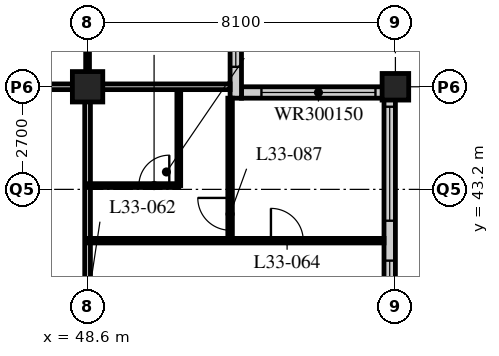
"""IFC4 building model, lengths in metres.
Left out: names, types, materials, properties, quantities, classifications, styles, units other than length and angle.
Written with IfcOpenShell. Run it as: python <this file> out.ifc"""

import sys

from ifc_helpers import new_model, si_unit, direction, frame, frame_2d, origin, origin_2d, place, context, subcontext, project, spatial, rectangle, hollow_rectangle, extrude, element, fill, save


model = new_model("IFC4")
c1 = context("Model", 3, precision=1e-05, world=origin(), true_north=direction((0.0, 1.0)))
c2 = subcontext(c1, "Body", "Model", "MODEL_VIEW")
j1 = project(units=[si_unit("LENGTHUNIT", "METRE"), si_unit("PLANEANGLEUNIT", "RADIAN")], contexts=[c1])
p1 = place(None, origin())
s1 = spatial("IfcSite", under=j1, at=p1, CompositionType="ELEMENT")
p2 = place(p1, origin())
s2 = spatial("IfcBuilding", under=s1, at=p2, CompositionType="ELEMENT")
p3 = place(p2, frame((0.0, 0.0, 130.6)))
s3 = spatial("IfcBuildingStorey", under=s2, at=p3, CompositionType="ELEMENT", Elevation=130.6)
p4 = place(p3, frame((48.6, 45.9, 0.0), z_axis=(0.0, 0.0, 1.0), x_axis=(1.0, 0.0, 0.0)))
e1 = element("IfcColumn", 1, at=p4, inside=s3, PredefinedType="COLUMN", context=c2, shape_type="SweptSolid", body=[
    extrude(hollow_rectangle(XDim=0.8, YDim=0.8, WallThickness=0.08, at=origin_2d()), origin(), (0.0, 0.0, 1.0), 3.4),
])
p5 = place(p3, frame((56.7, 45.9, 0.0), z_axis=(0.0, 0.0, 1.0), x_axis=(1.0, 0.0, 0.0)))
e2 = element("IfcColumn", 2, at=p5, inside=s3, PredefinedType="COLUMN", context=c2, shape_type="SweptSolid", body=[
    extrude(hollow_rectangle(XDim=0.7, YDim=0.7, WallThickness=0.07, at=origin_2d()), origin(), (0.0, 0.0, 1.0), 3.4),
])
p6 = place(p3, frame((56.55, 13.8, 0.0), z_axis=(0.0, 0.0, 1.0), x_axis=(0.0, 1.0, 0.0)))
e3 = element("IfcWall", 3, at=p6, inside=s3, PredefinedType="SOLIDWALL", context=c2, shape_type="SweptSolid", body=[
    extrude(rectangle(XDim=32.1, YDim=0.3, at=frame_2d((16.05, 0.0))), origin(), (0.0, 0.0, 1.0), 3.19),
])
p7 = place(p6, frame((0.225, 0.0, 0.9)))
e4 = element("IfcOpeningElement", 4, at=p7, cuts=e3, PredefinedType="OPENING", context=c2, shape_type="SweptSolid", body=[
    extrude(rectangle(XDim=3.0, YDim=2.0, at=frame_2d((1.5, 1.0))), frame((0.0, 0.16, 0.0), z_axis=(0.0, -1.0, 0.0), x_axis=(1.0, 0.0, 0.0)), (0.0, 0.0, 1.0), 0.32),
])
p8 = place(p6, frame((4.275, 0.0, 0.9)))
e5 = element("IfcOpeningElement", 5, at=p8, cuts=e3, PredefinedType="OPENING", context=c2, shape_type="SweptSolid", body=[
    extrude(rectangle(XDim=3.0, YDim=2.0, at=frame_2d((1.5, 1.0))), frame((0.0, 0.16, 0.0), z_axis=(0.0, -1.0, 0.0), x_axis=(1.0, 0.0, 0.0)), (0.0, 0.0, 1.0), 0.32),
])
p9 = place(p6, frame((8.325, 0.0, 0.9)))
e6 = element("IfcOpeningElement", 6, at=p9, cuts=e3, PredefinedType="OPENING", context=c2, shape_type="SweptSolid", body=[
    extrude(rectangle(XDim=3.0, YDim=2.0, at=frame_2d((1.5, 1.0))), frame((0.0, 0.16, 0.0), z_axis=(0.0, -1.0, 0.0), x_axis=(1.0, 0.0, 0.0)), (0.0, 0.0, 1.0), 0.32),
])
p10 = place(p6, frame((12.375, 0.0, 0.9)))
e7 = element("IfcOpeningElement", 7, at=p10, cuts=e3, PredefinedType="OPENING", context=c2, shape_type="SweptSolid", body=[
    extrude(rectangle(XDim=3.0, YDim=2.0, at=frame_2d((1.5, 1.0))), frame((0.0, 0.16, 0.0), z_axis=(0.0, -1.0, 0.0), x_axis=(1.0, 0.0, 0.0)), (0.0, 0.0, 1.0), 0.32),
])
p11 = place(p6, frame((16.425, 0.0, 0.9)))
e8 = element("IfcOpeningElement", 8, at=p11, cuts=e3, PredefinedType="OPENING", context=c2, shape_type="SweptSolid", body=[
    extrude(rectangle(XDim=3.0, YDim=2.0, at=frame_2d((1.5, 1.0))), frame((0.0, 0.16, 0.0), z_axis=(0.0, -1.0, 0.0), x_axis=(1.0, 0.0, 0.0)), (0.0, 0.0, 1.0), 0.32),
])
p12 = place(p6, frame((20.475, 0.0, 0.9)))
e9 = element("IfcOpeningElement", 9, at=p12, cuts=e3, PredefinedType="OPENING", context=c2, shape_type="SweptSolid", body=[
    extrude(rectangle(XDim=3.0, YDim=2.0, at=frame_2d((1.5, 1.0))), frame((0.0, 0.16, 0.0), z_axis=(0.0, -1.0, 0.0), x_axis=(1.0, 0.0, 0.0)), (0.0, 0.0, 1.0), 0.32),
])
p13 = place(p6, frame((24.525, 0.0, 0.9)))
e10 = element("IfcOpeningElement", 10, at=p13, cuts=e3, PredefinedType="OPENING", context=c2, shape_type="SweptSolid", body=[
    extrude(rectangle(XDim=3.0, YDim=2.0, at=frame_2d((1.5, 1.0))), frame((0.0, 0.16, 0.0), z_axis=(0.0, -1.0, 0.0), x_axis=(1.0, 0.0, 0.0)), (0.0, 0.0, 1.0), 0.32),
])
p14 = place(p6, frame((28.575, 0.0, 0.9)))
e11 = element("IfcOpeningElement", 11, at=p14, cuts=e3, PredefinedType="OPENING", context=c2, shape_type="SweptSolid", body=[
    extrude(rectangle(XDim=3.0, YDim=2.0, at=frame_2d((1.5, 1.0))), frame((0.0, 0.16, 0.0), z_axis=(0.0, -1.0, 0.0), x_axis=(1.0, 0.0, 0.0)), (0.0, 0.0, 1.0), 0.32),
])
p15 = place(p3, frame((56.4, 45.75, 0.0), z_axis=(0.0, 0.0, 1.0), x_axis=(-1.0, 0.0, 0.0)))
e12 = element("IfcWall", 12, at=p15, inside=s3, PredefinedType="SOLIDWALL", context=c2, shape_type="SweptSolid", body=[
    extrude(rectangle(XDim=3.75, YDim=0.3, at=frame_2d((1.875, 0.0))), origin(), (0.0, 0.0, 1.0), 3.19),
])
p16 = place(p15, frame((0.225, 0.0, 0.9)))
e13 = element("IfcOpeningElement", 13, at=p16, cuts=e12, PredefinedType="OPENING", context=c2, shape_type="SweptSolid", body=[
    extrude(rectangle(XDim=3.0, YDim=1.5, at=frame_2d((1.5, 0.75))), frame((0.0, 0.16, 0.0), z_axis=(0.0, -1.0, 0.0), x_axis=(1.0, 0.0, 0.0)), (0.0, 0.0, 1.0), 0.32),
])
p17 = place(p3, frame((52.5, 45.6, 0.0), z_axis=(0.0, 0.0, 1.0), x_axis=(0.0, 1.0, 0.0)))
e14 = element("IfcWall", 14, at=p17, inside=s3, PredefinedType="SOLIDWALL", context=c2, shape_type="SweptSolid", body=[
    extrude(rectangle(XDim=4.35, YDim=0.3, at=frame_2d((2.175, 0.0))), origin(), (0.0, 0.0, 1.0), 3.19),
])
p18 = place(p17, frame((0.825, 0.0, 0.9)))
e15 = element("IfcOpeningElement", 15, at=p18, cuts=e14, PredefinedType="OPENING", context=c2, shape_type="SweptSolid", body=[
    extrude(rectangle(XDim=3.0, YDim=1.5, at=frame_2d((1.5, 0.75))), frame((0.0, 0.16, 0.0), z_axis=(0.0, -1.0, 0.0), x_axis=(1.0, 0.0, 0.0)), (0.0, 0.0, 1.0), 0.32),
])
p19 = place(p3, frame((8.1, 45.9, 0.0), z_axis=(0.0, 0.0, 1.0), x_axis=(1.0, 0.0, 0.0)))
e16 = element("IfcWall", 16, at=p19, inside=s3, PredefinedType="PARTITIONING", context=c2, shape_type="SweptSolid", body=[
    extrude(rectangle(XDim=40.5, YDim=0.15, at=frame_2d((20.25, 0.0))), origin(), (0.0, 0.0, 1.0), 2.578),
])
p20 = place(p19, frame((9.625, 0.0, 0.0)))
e17 = element("IfcOpeningElement", 17, at=p20, cuts=e16, PredefinedType="OPENING", context=c2, shape_type="SweptSolid", body=[
    extrude(rectangle(XDim=1.0, YDim=2.1, at=frame_2d((0.5, 1.05))), frame((0.0, 0.085, 0.0), z_axis=(0.0, -1.0, 0.0), x_axis=(1.0, 0.0, 0.0)), (0.0, 0.0, 1.0), 0.17),
])
p21 = place(p19, frame((21.65, 0.0, 0.0)))
e18 = element("IfcOpeningElement", 18, at=p21, cuts=e16, PredefinedType="OPENING", context=c2, shape_type="SweptSolid", body=[
    extrude(rectangle(XDim=1.0, YDim=2.1, at=frame_2d((0.5, 1.05))), frame((0.0, 0.085, 0.0), z_axis=(0.0, -1.0, 0.0), x_axis=(1.0, 0.0, 0.0)), (0.0, 0.0, 1.0), 0.17),
])
p22 = place(p19, frame((26.75, 0.0, 0.0)))
e19 = element("IfcOpeningElement", 19, at=p22, cuts=e16, PredefinedType="OPENING", context=c2, shape_type="SweptSolid", body=[
    extrude(rectangle(XDim=1.0, YDim=2.1, at=frame_2d((0.5, 1.05))), frame((0.0, 0.085, 0.0), z_axis=(0.0, -1.0, 0.0), x_axis=(1.0, 0.0, 0.0)), (0.0, 0.0, 1.0), 0.17),
])
p23 = place(p19, frame((28.95, 0.0, 0.0)))
e20 = element("IfcOpeningElement", 20, at=p23, cuts=e16, PredefinedType="OPENING", context=c2, shape_type="SweptSolid", body=[
    extrude(rectangle(XDim=1.0, YDim=2.1, at=frame_2d((0.5, 1.05))), frame((0.0, 0.085, 0.0), z_axis=(0.0, -1.0, 0.0), x_axis=(1.0, 0.0, 0.0)), (0.0, 0.0, 1.0), 0.17),
])
p24 = place(p19, frame((34.85, 0.0, 0.0)))
e21 = element("IfcOpeningElement", 21, at=p24, cuts=e16, PredefinedType="OPENING", context=c2, shape_type="SweptSolid", body=[
    extrude(rectangle(XDim=1.0, YDim=2.1, at=frame_2d((0.5, 1.05))), frame((0.0, 0.085, 0.0), z_axis=(0.0, -1.0, 0.0), x_axis=(1.0, 0.0, 0.0)), (0.0, 0.0, 1.0), 0.17),
])
p25 = place(p19, frame((36.875, 0.0, 0.0)))
e22 = element("IfcOpeningElement", 22, at=p25, cuts=e16, PredefinedType="OPENING", context=c2, shape_type="SweptSolid", body=[
    extrude(rectangle(XDim=1.0, YDim=2.1, at=frame_2d((0.5, 1.05))), frame((0.0, 0.085, 0.0), z_axis=(0.0, -1.0, 0.0), x_axis=(1.0, 0.0, 0.0)), (0.0, 0.0, 1.0), 0.17),
])
p26 = place(p19, frame((2.625, 0.0, 0.0)))
e23 = element("IfcOpeningElement", 23, at=p26, cuts=e16, PredefinedType="OPENING", context=c2, shape_type="SweptSolid", body=[
    extrude(rectangle(XDim=1.0, YDim=2.1, at=frame_2d((0.5, 1.05))), frame((0.0, 0.085, 0.0), z_axis=(0.0, -1.0, 0.0), x_axis=(1.0, 0.0, 0.0)), (0.0, 0.0, 1.0), 0.17),
])
p27 = place(p3, frame((48.6, 21.6, 0.0), z_axis=(0.0, 0.0, 1.0), x_axis=(0.0, 1.0, 0.0)))
e24 = element("IfcWall", 24, at=p27, inside=s3, PredefinedType="PARTITIONING", context=c2, shape_type="SweptSolid", body=[
    extrude(rectangle(XDim=24.3, YDim=0.15, at=frame_2d((12.15, 0.0))), origin(), (0.0, 0.0, 1.0), 2.578),
])
p28 = place(p27, frame((2.75, 0.0, 0.0)))
e25 = element("IfcOpeningElement", 25, at=p28, cuts=e24, PredefinedType="OPENING", context=c2, shape_type="SweptSolid", body=[
    extrude(rectangle(XDim=1.0, YDim=2.1, at=frame_2d((0.5, 1.05))), frame((0.0, 0.085, 0.0), z_axis=(0.0, -1.0, 0.0), x_axis=(1.0, 0.0, 0.0)), (0.0, 0.0, 1.0), 0.17),
])
p29 = place(p27, frame((4.65, 0.0, 0.0)))
e26 = element("IfcOpeningElement", 26, at=p29, cuts=e24, PredefinedType="OPENING", context=c2, shape_type="SweptSolid", body=[
    extrude(rectangle(XDim=1.0, YDim=2.1, at=frame_2d((0.5, 1.05))), frame((0.0, 0.085, 0.0), z_axis=(0.0, -1.0, 0.0), x_axis=(1.0, 0.0, 0.0)), (0.0, 0.0, 1.0), 0.17),
])
p30 = place(p27, frame((10.0, 0.0, 0.0)))
e27 = element("IfcOpeningElement", 27, at=p30, cuts=e24, PredefinedType="OPENING", context=c2, shape_type="SweptSolid", body=[
    extrude(rectangle(XDim=1.0, YDim=2.1, at=frame_2d((0.5, 1.05))), frame((0.0, 0.085, 0.0), z_axis=(0.0, -1.0, 0.0), x_axis=(1.0, 0.0, 0.0)), (0.0, 0.0, 1.0), 0.17),
])
p31 = place(p27, frame((18.1, 0.0, 0.0)))
e28 = element("IfcOpeningElement", 28, at=p31, cuts=e24, PredefinedType="OPENING", context=c2, shape_type="SweptSolid", body=[
    extrude(rectangle(XDim=1.0, YDim=2.1, at=frame_2d((0.5, 1.05))), frame((0.0, 0.085, 0.0), z_axis=(0.0, -1.0, 0.0), x_axis=(1.0, 0.0, 0.0)), (0.0, 0.0, 1.0), 0.17),
])
p32 = place(p3, frame((51.0, 43.3, 0.0), z_axis=(0.0, 0.0, 1.0), x_axis=(0.0, 1.0, 0.0)))
e29 = element("IfcWall", 29, at=p32, inside=s3, PredefinedType="PARTITIONING", context=c2, shape_type="SweptSolid", body=[
    extrude(rectangle(XDim=2.6, YDim=0.1, at=frame_2d((1.3, 0.0))), origin(), (0.0, 0.0, 1.0), 3.19),
])
p33 = place(p3, frame((48.6, 43.3, 0.0), z_axis=(0.0, 0.0, 1.0), x_axis=(1.0, 0.0, 0.0)))
e30 = element("IfcWall", 30, at=p33, inside=s3, PredefinedType="PARTITIONING", context=c2, shape_type="SweptSolid", body=[
    extrude(rectangle(XDim=2.4, YDim=0.1, at=frame_2d((1.2, 0.0))), origin(), (0.0, 0.0, 1.0), 3.19),
])
p34 = place(p33, frame((1.35, 0.0, 0.0)))
e31 = element("IfcOpeningElement", 31, at=p34, cuts=e30, PredefinedType="OPENING", context=c2, shape_type="SweptSolid", body=[
    extrude(rectangle(XDim=0.8, YDim=2.1, at=frame_2d((0.4, 1.05))), frame((0.0, 0.06, 0.0), z_axis=(0.0, -1.0, 0.0), x_axis=(1.0, 0.0, 0.0)), (0.0, 0.0, 1.0), 0.12),
])
p35 = place(p3, frame((48.6, 41.85, 0.0), z_axis=(0.0, 0.0, 1.0), x_axis=(1.0, 0.0, 0.0)))
e32 = element("IfcWall", 32, at=p35, inside=s3, PredefinedType="PARTITIONING", context=c2, shape_type="SweptSolid", body=[
    extrude(rectangle(XDim=7.8, YDim=0.12, at=frame_2d((3.9, 0.0))), origin(), (0.0, 0.0, 1.0), 3.19),
])
p36 = place(p35, frame((4.825, 0.0, 0.0)))
e33 = element("IfcOpeningElement", 33, at=p36, cuts=e32, PredefinedType="OPENING", context=c2, shape_type="SweptSolid", body=[
    extrude(rectangle(XDim=0.85, YDim=2.1, at=frame_2d((0.425, 1.05))), frame((0.0, 0.07, 0.0), z_axis=(0.0, -1.0, 0.0), x_axis=(1.0, 0.0, 0.0)), (0.0, 0.0, 1.0), 0.14),
])
p37 = place(p3, frame((48.6, 45.9, 0.0), z_axis=(0.0, 0.0, 1.0), x_axis=(0.0, 1.0, 0.0)))
e34 = element("IfcWall", 34, at=p37, inside=s3, PredefinedType="PARTITIONING", context=c2, shape_type="SweptSolid", body=[
    extrude(rectangle(XDim=2.4, YDim=0.1, at=frame_2d((1.2, 0.0))), origin(), (0.0, 0.0, 1.0), 2.578),
])
p38 = place(p3, frame((48.6, 45.9, 0.0), z_axis=(0.0, 0.0, 1.0), x_axis=(1.0, 0.0, 0.0)))
e35 = element("IfcWall", 35, at=p38, inside=s3, PredefinedType="PARTITIONING", context=c2, shape_type="SweptSolid", body=[
    extrude(rectangle(XDim=3.75, YDim=0.15, at=frame_2d((1.875, 0.0))), origin(), (0.0, 0.0, 1.0), 2.578),
])
p39 = place(p3, frame((52.35, 45.6, 0.0), z_axis=(0.0, 0.0, 1.0), x_axis=(0.0, -1.0, 0.0)))
e36 = element("IfcWall", 36, at=p39, inside=s3, PredefinedType="PARTITIONING", context=c2, shape_type="SweptSolid", body=[
    extrude(rectangle(XDim=3.75, YDim=0.12, at=frame_2d((1.875, 0.0))), origin(), (0.0, 0.0, 1.0), 3.19),
])
p40 = place(p39, frame((2.625, 0.0, 0.0)))
e37 = element("IfcOpeningElement", 37, at=p40, cuts=e36, PredefinedType="OPENING", context=c2, shape_type="SweptSolid", body=[
    extrude(rectangle(XDim=0.85, YDim=2.1, at=frame_2d((0.425, 1.05))), frame((0.0, 0.07, 0.0), z_axis=(0.0, -1.0, 0.0), x_axis=(1.0, 0.0, 0.0)), (0.0, 0.0, 1.0), 0.14),
])
p41 = place(p13, origin())
e38 = element("IfcWindow", 38, at=p41, inside=s3, PartitioningType="SINGLE_PANEL", PredefinedType="WINDOW", context=c2, shape_type="SweptSolid", body=[
    extrude(rectangle(XDim=3.0, YDim=2.0, at=frame_2d((1.5, 1.0))), frame((0.0, 0.03, 0.0), z_axis=(0.0, -1.0, 0.0), x_axis=(1.0, 0.0, 0.0)), (0.0, 0.0, 1.0), 0.06),
])
fill(e10, e38)
p42 = place(p14, origin())
e39 = element("IfcWindow", 39, at=p42, inside=s3, PartitioningType="SINGLE_PANEL", PredefinedType="WINDOW", context=c2, shape_type="SweptSolid", body=[
    extrude(rectangle(XDim=3.0, YDim=2.0, at=frame_2d((1.5, 1.0))), frame((0.0, 0.03, 0.0), z_axis=(0.0, -1.0, 0.0), x_axis=(1.0, 0.0, 0.0)), (0.0, 0.0, 1.0), 0.06),
])
fill(e11, e39)
p43 = place(p16, origin())
e40 = element("IfcWindow", 40, at=p43, inside=s3, PartitioningType="SINGLE_PANEL", PredefinedType="WINDOW", context=c2, shape_type="SweptSolid", body=[
    extrude(rectangle(XDim=3.0, YDim=1.5, at=frame_2d((1.5, 0.75))), frame((0.0, 0.03, 0.0), z_axis=(0.0, -1.0, 0.0), x_axis=(1.0, 0.0, 0.0)), (0.0, 0.0, 1.0), 0.06),
])
fill(e13, e40)
p44 = place(p18, origin())
e41 = element("IfcWindow", 41, at=p44, inside=s3, PartitioningType="SINGLE_PANEL", PredefinedType="WINDOW", context=c2, shape_type="SweptSolid", body=[
    extrude(rectangle(XDim=3.0, YDim=1.5, at=frame_2d((1.5, 0.75))), frame((0.0, 0.03, 0.0), z_axis=(0.0, -1.0, 0.0), x_axis=(1.0, 0.0, 0.0)), (0.0, 0.0, 1.0), 0.06),
])
fill(e15, e41)
p45 = place(p34, origin())
e42 = element("IfcDoor", 42, at=p45, inside=s3, OperationType="SINGLE_SWING_RIGHT", PredefinedType="DOOR", context=c2, shape_type="SweptSolid", body=[
    extrude(rectangle(XDim=0.8, YDim=2.1, at=frame_2d((0.4, 1.05))), frame((0.0, 0.025, 0.0), z_axis=(0.0, -1.0, 0.0), x_axis=(1.0, 0.0, 0.0)), (0.0, 0.0, 1.0), 0.05),
])
fill(e31, e42)
p46 = place(p36, origin())
e43 = element("IfcDoor", 43, at=p46, inside=s3, OperationType="SINGLE_SWING_LEFT", PredefinedType="DOOR", context=c2, shape_type="SweptSolid", body=[
    extrude(rectangle(XDim=0.85, YDim=2.1, at=frame_2d((0.425, 1.05))), frame((0.0, 0.025, 0.0), z_axis=(0.0, -1.0, 0.0), x_axis=(1.0, 0.0, 0.0)), (0.0, 0.0, 1.0), 0.05),
])
fill(e33, e43)
p47 = place(p40, origin())
e44 = element("IfcDoor", 44, at=p47, inside=s3, OperationType="SINGLE_SWING_RIGHT", PredefinedType="DOOR", context=c2, shape_type="SweptSolid", body=[
    extrude(rectangle(XDim=0.85, YDim=2.1, at=frame_2d((0.425, 1.05))), frame((0.0, 0.025, 0.0), z_axis=(0.0, -1.0, 0.0), x_axis=(1.0, 0.0, 0.0)), (0.0, 0.0, 1.0), 0.05),
])
fill(e37, e44)
save(model, sys.argv[1])
